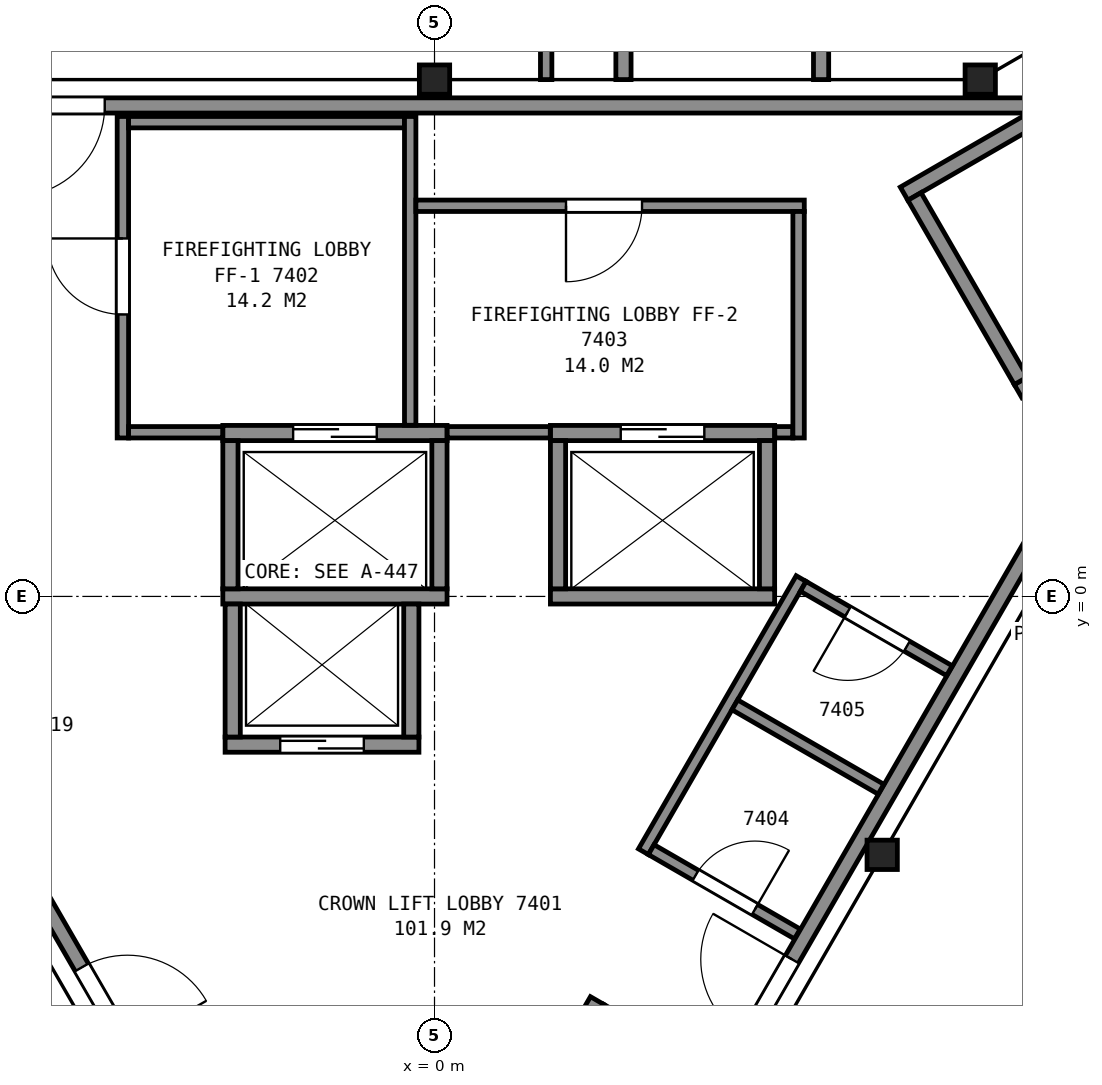
"""IFC4 building model, lengths in metres.
Left out: names, types, materials, properties, quantities, classifications, styles, units other than length and angle.
Written with IfcOpenShell. Run it as: python <this file> out.ifc"""

import sys

from ifc_helpers import new_model, si_unit, direction, frame, frame_2d, origin, origin_2d, place, context, subcontext, project, spatial, rectangle, i_section, extrude, element, fill, save


model = new_model("IFC4")
c1 = context("Model", 3, precision=1e-05, world=origin(), true_north=direction((0.0, 1.0)))
c2 = subcontext(c1, "Body", "Model", "MODEL_VIEW")
j1 = project(units=[si_unit("LENGTHUNIT", "METRE"), si_unit("PLANEANGLEUNIT", "RADIAN")], contexts=[c1])
p1 = place(None, origin())
s1 = spatial("IfcSite", under=j1, at=p1, CompositionType="ELEMENT")
p2 = place(p1, origin())
s2 = spatial("IfcBuilding", under=s1, at=p2, CompositionType="ELEMENT")
p3 = place(p2, frame((0.0, 0.0, 293.6)))
s3 = spatial("IfcBuildingStorey", under=s2, at=p3, CompositionType="ELEMENT", Elevation=293.6)
for number, where, z_axis, x_axis in (
    (1, (7.18, 6.8, 0.0), (0.0, 0.0, 1.0), (1.0, 0.0, 0.0)),
    (2, (0.0, 6.8, 0.0), (0.0, 0.0, 1.0), (1.0, 0.0, 0.0)),
    (3, (5.89, -3.4, 0.0), (0.0, 0.0, 1.0), (1.0, 0.0, 0.0)),
):
    element("IfcColumn", number, at=place(p3, frame(where, z_axis=z_axis, x_axis=x_axis)), inside=s3, PredefinedType="COLUMN", context=c2, shape_type="SweptSolid", body=[
        extrude(i_section(OverallWidth=0.399, OverallDepth=0.386, WebThickness=0.021, FlangeThickness=0.033, FilletRadius=0.015, at=origin_2d()), origin(), (0.0, 0.0, 1.0), 3.7),
    ])
for number, where, z_axis, x_axis in (
    (4, (6.178, 5.299, 0.0), (0.0, 0.0, 1.0), (0.866, 0.5, 0.0)),
    (5, (7.678, 2.701, 0.0), (0.0, 0.0, 1.0), (0.866, 0.5, 0.0)),
):
    element("IfcWall", number, at=place(p3, frame(where, z_axis=z_axis, x_axis=x_axis)), inside=s3, PredefinedType="PARTITIONING", context=c2, shape_type="SweptSolid", body=[
        extrude(rectangle(XDim=7.2, YDim=0.2, at=frame_2d((3.6, 0.0))), origin(), (0.0, 0.0, 1.0), 3.45),
    ])
p4 = place(p3, frame((7.715, 2.838, 0.0), z_axis=(0.0, 0.0, 1.0), x_axis=(-0.500049511043, 0.865996816683, 0.0)))
e6 = element("IfcWall", 6, at=p4, inside=s3, PredefinedType="PARTITIONING", context=c2, shape_type="SweptSolid", body=[
    extrude(rectangle(XDim=2.8, YDim=0.2, at=frame_2d((1.4, 0.0))), origin(), (0.0, 0.0, 1.0), 3.45),
])
p5 = place(p3, frame((-2.755, -1.95, 0.0), z_axis=(0.0, 0.0, 1.0), x_axis=(1.0, 0.0, 0.0)))
e7 = element("IfcWall", 7, at=p5, inside=s3, PredefinedType="PARTITIONING", context=c2, shape_type="SweptSolid", body=[
    extrude(rectangle(XDim=2.55, YDim=0.2, at=frame_2d((1.275, 0.0))), origin(), (0.0, 0.0, 1.0), 3.7),
])
p6 = place(p5, frame((0.725, 0.0, 0.0)))
e8 = element("IfcOpeningElement", 8, at=p6, cuts=e7, PredefinedType="OPENING", context=c2, shape_type="SweptSolid", body=[
    extrude(rectangle(XDim=1.1, YDim=2.1, at=frame_2d((0.55, 1.05))), frame((0.0, 0.11, 0.0), z_axis=(0.0, -1.0, 0.0), x_axis=(1.0, 0.0, 0.0)), (0.0, 0.0, 1.0), 0.22),
])
p7 = place(p3, frame((-2.785, 0.0, 0.0), z_axis=(0.0, 0.0, 1.0), x_axis=(1.0, 0.0, 0.0)))
e9 = element("IfcWall", 9, at=p7, inside=s3, PredefinedType="PARTITIONING", context=c2, shape_type="SweptSolid", body=[
    extrude(rectangle(XDim=2.95, YDim=0.2, at=frame_2d((1.475, 0.0))), origin(), (0.0, 0.0, 1.0), 3.7),
])
p8 = place(p3, frame((1.525, 0.0, 0.0), z_axis=(0.0, 0.0, 1.0), x_axis=(1.0, 0.0, 0.0)))
e10 = element("IfcWall", 10, at=p8, inside=s3, PredefinedType="PARTITIONING", context=c2, shape_type="SweptSolid", body=[
    extrude(rectangle(XDim=2.95, YDim=0.2, at=frame_2d((1.475, 0.0))), origin(), (0.0, 0.0, 1.0), 3.7),
])
p9 = place(p3, frame((-2.785, 2.15, 0.0), z_axis=(0.0, 0.0, 1.0), x_axis=(1.0, 0.0, 0.0)))
e11 = element("IfcWall", 11, at=p9, inside=s3, PredefinedType="PARTITIONING", context=c2, shape_type="SweptSolid", body=[
    extrude(rectangle(XDim=2.95, YDim=0.2, at=frame_2d((1.475, 0.0))), origin(), (0.0, 0.0, 1.0), 3.7),
])
p10 = place(p9, frame((0.925, 0.0, 0.0)))
e12 = element("IfcOpeningElement", 12, at=p10, cuts=e11, PredefinedType="OPENING", context=c2, shape_type="SweptSolid", body=[
    extrude(rectangle(XDim=1.1, YDim=2.1, at=frame_2d((0.55, 1.05))), frame((0.0, 0.11, 0.0), z_axis=(0.0, -1.0, 0.0), x_axis=(1.0, 0.0, 0.0)), (0.0, 0.0, 1.0), 0.22),
])
p11 = place(p3, frame((1.525, 2.15, 0.0), z_axis=(0.0, 0.0, 1.0), x_axis=(1.0, 0.0, 0.0)))
e13 = element("IfcWall", 13, at=p11, inside=s3, PredefinedType="PARTITIONING", context=c2, shape_type="SweptSolid", body=[
    extrude(rectangle(XDim=2.95, YDim=0.2, at=frame_2d((1.475, 0.0))), origin(), (0.0, 0.0, 1.0), 3.7),
])
p12 = place(p11, frame((0.925, 0.0, 0.0)))
e14 = element("IfcOpeningElement", 14, at=p12, cuts=e13, PredefinedType="OPENING", context=c2, shape_type="SweptSolid", body=[
    extrude(rectangle(XDim=1.1, YDim=2.1, at=frame_2d((0.55, 1.05))), frame((0.0, 0.11, 0.0), z_axis=(0.0, -1.0, 0.0), x_axis=(1.0, 0.0, 0.0)), (0.0, 0.0, 1.0), 0.22),
])
p13 = place(p3, frame((0.863, -7.525, 0.0), z_axis=(0.0, 0.0, 1.0), x_axis=(0.499990435942, 0.866030925526, 0.0)))
e15 = element("IfcWall", 15, at=p13, inside=s3, PredefinedType="PARTITIONING", context=c2, shape_type="SweptSolid", body=[
    extrude(rectangle(XDim=2.55, YDim=0.2, at=frame_2d((1.275, 0.0))), origin(), (0.0, 0.0, 1.0), 3.7),
])
p14 = place(p13, frame((0.725, 0.0, 0.0)))
e16 = element("IfcOpeningElement", 16, at=p14, cuts=e15, PredefinedType="OPENING", context=c2, shape_type="SweptSolid", body=[
    extrude(rectangle(XDim=1.1, YDim=2.1, at=frame_2d((0.55, 1.05))), frame((0.0, 0.11, 0.0), z_axis=(0.0, -1.0, 0.0), x_axis=(1.0, 0.0, 0.0)), (0.0, 0.0, 1.0), 0.22),
])
for number, where, z_axis, x_axis in (
    (17, (4.375, 0.1, 0.0), (0.0, 0.0, 1.0), (0.0, 1.0, 0.0)),
    (18, (1.625, 0.1, 0.0), (0.0, 0.0, 1.0), (0.0, 1.0, 0.0)),
    (19, (0.065, 0.1, 0.0), (0.0, 0.0, 1.0), (0.0, 1.0, 0.0)),
):
    element("IfcWall", number, at=place(p3, frame(where, z_axis=z_axis, x_axis=x_axis)), inside=s3, PredefinedType="PARTITIONING", context=c2, shape_type="SweptSolid", body=[
        extrude(rectangle(XDim=1.95, YDim=0.2, at=frame_2d((0.975, 0.0))), origin(), (0.0, 0.0, 1.0), 3.7),
    ])
for number, where, z_axis, x_axis in (
    (20, (-0.305, -1.85, 0.0), (0.0, 0.0, 1.0), (0.0, 1.0, 0.0)),
    (21, (-2.655, -1.85, 0.0), (0.0, 0.0, 1.0), (0.0, 1.0, 0.0)),
):
    element("IfcWall", number, at=place(p3, frame(where, z_axis=z_axis, x_axis=x_axis)), inside=s3, PredefinedType="PARTITIONING", context=c2, shape_type="SweptSolid", body=[
        extrude(rectangle(XDim=1.75, YDim=0.2, at=frame_2d((0.875, 0.0))), origin(), (0.0, 0.0, 1.0), 3.7),
    ])
p15 = place(p3, frame((-2.685, 0.1, 0.0), z_axis=(0.0, 0.0, 1.0), x_axis=(0.0, 1.0, 0.0)))
e22 = element("IfcWall", 22, at=p15, inside=s3, PredefinedType="PARTITIONING", context=c2, shape_type="SweptSolid", body=[
    extrude(rectangle(XDim=1.95, YDim=0.2, at=frame_2d((0.975, 0.0))), origin(), (0.0, 0.0, 1.0), 3.7),
])
p16 = place(p3, frame((3.69, -6.328, 0.0), z_axis=(0.0, 0.0, 1.0), x_axis=(-0.866036909293, 0.499980071345, 0.0)))
e23 = element("IfcWall", 23, at=p16, inside=s3, PredefinedType="PARTITIONING", context=c2, shape_type="SweptSolid", body=[
    extrude(rectangle(XDim=1.75, YDim=0.2, at=frame_2d((0.875, 0.0))), origin(), (0.0, 0.0, 1.0), 3.7),
])
p17 = place(p3, frame((7.829, 6.46, 0.0), z_axis=(0.0, 0.0, 1.0), x_axis=(-1.0, 0.0, 0.0)))
e24 = element("IfcWall", 24, at=p17, inside=s3, PredefinedType="PARTITIONING", context=c2, shape_type="SweptSolid", body=[
    extrude(rectangle(XDim=15.658, YDim=0.2, at=frame_2d((7.829, 0.0))), origin(), (0.0, 0.0, 1.0), 3.45),
])
p18 = place(p17, frame((12.168, 0.0, 0.0)))
e25 = element("IfcOpeningElement", 25, at=p18, cuts=e24, PredefinedType="OPENING", context=c2, shape_type="SweptSolid", body=[
    extrude(rectangle(XDim=1.2, YDim=2.1, at=frame_2d((0.6, 1.05))), frame((0.0, 0.11, 0.0), z_axis=(0.0, -1.0, 0.0), x_axis=(1.0, 0.0, 0.0)), (0.0, 0.0, 1.0), 0.22),
])
p19 = place(p3, frame((-7.141, -0.551, 0.0), z_axis=(0.0, 0.0, 1.0), x_axis=(0.500001302854, -0.86602465158, 0.0)))
e26 = element("IfcWall", 26, at=p19, inside=s3, PredefinedType="PARTITIONING", context=c2, shape_type="SweptSolid", body=[
    extrude(rectangle(XDim=6.846, YDim=0.2, at=frame_2d((3.423, 0.0))), origin(), (0.0, 0.0, 1.0), 3.45),
])
p20 = place(p19, frame((5.0, 0.0, 0.0)))
e27 = element("IfcOpeningElement", 27, at=p20, cuts=e26, PredefinedType="OPENING", context=c2, shape_type="SweptSolid", body=[
    extrude(rectangle(XDim=1.2, YDim=2.1, at=frame_2d((0.6, 1.05))), frame((0.0, 0.11, 0.0), z_axis=(0.0, -1.0, 0.0), x_axis=(1.0, 0.0, 0.0)), (0.0, 0.0, 1.0), 0.22),
])
p21 = place(p3, frame((-4.1, 2.085, 0.0), z_axis=(0.0, 0.0, 1.0), x_axis=(0.0, 1.0, 0.0)))
e28 = element("IfcWall", 28, at=p21, inside=s3, PredefinedType="PARTITIONING", context=c2, shape_type="SweptSolid", body=[
    extrude(rectangle(XDim=4.23, YDim=0.15, at=frame_2d((2.115, 0.0))), origin(), (0.0, 0.0, 1.0), 3.45),
])
p22 = place(p21, frame((1.625, 0.0, 0.0)))
e29 = element("IfcOpeningElement", 29, at=p22, cuts=e28, PredefinedType="OPENING", context=c2, shape_type="SweptSolid", body=[
    extrude(rectangle(XDim=1.0, YDim=2.1, at=frame_2d((0.5, 1.05))), frame((0.0, 0.085, 0.0), z_axis=(0.0, -1.0, 0.0), x_axis=(1.0, 0.0, 0.0)), (0.0, 0.0, 1.0), 0.17),
])
p23 = place(p3, frame((-4.025, 2.16, 0.0), z_axis=(0.0, 0.0, 1.0), x_axis=(1.0, 0.0, 0.0)))
e30 = element("IfcWall", 30, at=p23, inside=s3, PredefinedType="PARTITIONING", context=c2, shape_type="SweptSolid", body=[
    extrude(rectangle(XDim=1.238, YDim=0.15, at=frame_2d((0.619, 0.0))), origin(), (0.0, 0.0, 1.0), 3.45),
])
p24 = place(p3, frame((-4.025, 6.24, 0.0), z_axis=(0.0, 0.0, 1.0), x_axis=(1.0, 0.0, 0.0)))
e31 = element("IfcWall", 31, at=p24, inside=s3, PredefinedType="PARTITIONING", context=c2, shape_type="SweptSolid", body=[
    extrude(rectangle(XDim=3.63, YDim=0.15, at=frame_2d((1.815, 0.0))), origin(), (0.0, 0.0, 1.0), 3.45),
])
p25 = place(p3, frame((-0.32, 2.252, 0.0), z_axis=(0.0, 0.0, 1.0), x_axis=(0.0, 1.0, 0.0)))
e32 = element("IfcWall", 32, at=p25, inside=s3, PredefinedType="PARTITIONING", context=c2, shape_type="SweptSolid", body=[
    extrude(rectangle(XDim=4.063, YDim=0.15, at=frame_2d((2.031, 0.0))), origin(), (0.0, 0.0, 1.0), 3.45),
])
p26 = place(p3, frame((-0.245, 5.14, 0.0), z_axis=(0.0, 0.0, 1.0), x_axis=(1.0, 0.0, 0.0)))
e33 = element("IfcWall", 33, at=p26, inside=s3, PredefinedType="PARTITIONING", context=c2, shape_type="SweptSolid", body=[
    extrude(rectangle(XDim=5.11, YDim=0.15, at=frame_2d((2.555, 0.0))), origin(), (0.0, 0.0, 1.0), 3.45),
])
p27 = place(p26, frame((1.975, 0.0, 0.0)))
e34 = element("IfcOpeningElement", 34, at=p27, cuts=e33, PredefinedType="OPENING", context=c2, shape_type="SweptSolid", body=[
    extrude(rectangle(XDim=1.0, YDim=2.1, at=frame_2d((0.5, 1.05))), frame((0.0, 0.085, 0.0), z_axis=(0.0, -1.0, 0.0), x_axis=(1.0, 0.0, 0.0)), (0.0, 0.0, 1.0), 0.17),
])
p28 = place(p3, frame((0.167, 2.16, 0.0), z_axis=(0.0, 0.0, 1.0), x_axis=(1.0, 0.0, 0.0)))
e35 = element("IfcWall", 35, at=p28, inside=s3, PredefinedType="PARTITIONING", context=c2, shape_type="SweptSolid", body=[
    extrude(rectangle(XDim=1.356, YDim=0.15, at=frame_2d((0.678, 0.0))), origin(), (0.0, 0.0, 1.0), 3.45),
])
p29 = place(p3, frame((2.749, -3.359, 0.0), z_axis=(0.0, 0.0, 1.0), x_axis=(0.500017827812, 0.866015110648, 0.0)))
e36 = element("IfcWall", 36, at=p29, inside=s3, PredefinedType="PARTITIONING", context=c2, shape_type="SweptSolid", body=[
    extrude(rectangle(XDim=4.15, YDim=0.15, at=frame_2d((2.075, 0.0))), origin(), (0.0, 0.0, 1.0), 3.45),
])
p30 = place(p3, frame((2.851, -3.332, 0.0), z_axis=(0.0, 0.0, 1.0), x_axis=(0.866110524189, -0.499852538144, 0.0)))
e37 = element("IfcWall", 37, at=p30, inside=s3, PredefinedType="PARTITIONING", context=c2, shape_type="SweptSolid", body=[
    extrude(rectangle(XDim=2.22, YDim=0.15, at=frame_2d((1.11, 0.0))), origin(), (0.0, 0.0, 1.0), 3.45),
])
p31 = place(p30, frame((0.675, 0.0, 0.0)))
e38 = element("IfcOpeningElement", 38, at=p31, cuts=e37, PredefinedType="OPENING", context=c2, shape_type="SweptSolid", body=[
    extrude(rectangle(XDim=0.9, YDim=2.1, at=frame_2d((0.45, 1.05))), frame((0.0, 0.085, 0.0), z_axis=(0.0, -1.0, 0.0), x_axis=(1.0, 0.0, 0.0)), (0.0, 0.0, 1.0), 0.17),
])
p32 = place(p3, frame((3.828, -6.29, 0.0), z_axis=(0.0, 0.0, 1.0), x_axis=(0.499979739078, 0.866037101117, 0.0)))
e39 = element("IfcWall", 39, at=p32, inside=s3, PredefinedType="PARTITIONING", context=c2, shape_type="SweptSolid", body=[
    extrude(rectangle(XDim=11.363, YDim=0.2, at=frame_2d((5.681, 0.0))), origin(), (0.0, 0.0, 1.0), 3.45),
])
p33 = place(p32, frame((0.55, 0.0, 0.0)))
e40 = element("IfcOpeningElement", 40, at=p33, cuts=e39, PredefinedType="OPENING", context=c2, shape_type="SweptSolid", body=[
    extrude(rectangle(XDim=1.2, YDim=2.1, at=frame_2d((0.6, 1.05))), frame((0.0, 0.11, 0.0), z_axis=(0.0, -1.0, 0.0), x_axis=(1.0, 0.0, 0.0)), (0.0, 0.0, 1.0), 0.22),
])
p34 = place(p3, frame((3.951, -1.427, 0.0), z_axis=(0.0, 0.0, 1.0), x_axis=(0.866062920605, -0.499935013329, 0.0)))
e41 = element("IfcWall", 41, at=p34, inside=s3, PredefinedType="PARTITIONING", context=c2, shape_type="SweptSolid", body=[
    extrude(rectangle(XDim=2.22, YDim=0.15, at=frame_2d((1.11, 0.0))), origin(), (0.0, 0.0, 1.0), 3.45),
])
p35 = place(p3, frame((4.477, 2.16, 0.0), z_axis=(0.0, 0.0, 1.0), x_axis=(1.0, 0.0, 0.0)))
e42 = element("IfcWall", 42, at=p35, inside=s3, PredefinedType="PARTITIONING", context=c2, shape_type="SweptSolid", body=[
    extrude(rectangle(XDim=0.238, YDim=0.15, at=frame_2d((0.119, 0.0))), origin(), (0.0, 0.0, 1.0), 3.45),
])
p36 = place(p3, frame((6.774, -0.978, 0.0), z_axis=(0.0, 0.0, 1.0), x_axis=(-0.866062920605, 0.499935013329, 0.0)))
e43 = element("IfcWall", 43, at=p36, inside=s3, PredefinedType="PARTITIONING", context=c2, shape_type="SweptSolid", body=[
    extrude(rectangle(XDim=2.22, YDim=0.15, at=frame_2d((1.11, 0.0))), origin(), (0.0, 0.0, 1.0), 3.45),
])
p37 = place(p36, frame((0.646, 0.0, 0.0)))
e44 = element("IfcOpeningElement", 44, at=p37, cuts=e43, PredefinedType="OPENING", context=c2, shape_type="SweptSolid", body=[
    extrude(rectangle(XDim=0.9, YDim=2.1, at=frame_2d((0.45, 1.05))), frame((0.0, 0.085, 0.0), z_axis=(0.0, -1.0, 0.0), x_axis=(1.0, 0.0, 0.0)), (0.0, 0.0, 1.0), 0.17),
])
p38 = place(p3, frame((4.79, 2.085, 0.0), z_axis=(0.0, 0.0, 1.0), x_axis=(0.0, 1.0, 0.0)))
e45 = element("IfcWall", 45, at=p38, inside=s3, PredefinedType="PARTITIONING", context=c2, shape_type="SweptSolid", body=[
    extrude(rectangle(XDim=2.98, YDim=0.15, at=frame_2d((1.49, 0.0))), origin(), (0.0, 0.0, 1.0), 3.45),
])
p39 = place(p3, frame((1.469, 6.8, 0.0), z_axis=(0.0, 0.0, 1.0), x_axis=(0.0, 1.0, 0.0)))
e46 = element("IfcWall", 46, at=p39, inside=s3, PredefinedType="PARTITIONING", context=c2, shape_type="SweptSolid", body=[
    extrude(rectangle(XDim=1.469, YDim=0.15, at=frame_2d((0.734, 0.0))), origin(), (0.0, 0.0, 1.0), 2.723),
])
p40 = place(p3, frame((2.486, 6.8, 0.0), z_axis=(0.0, 0.0, 1.0), x_axis=(0.0, 1.0, 0.0)))
e47 = element("IfcWall", 47, at=p40, inside=s3, PredefinedType="PARTITIONING", context=c2, shape_type="SweptSolid", body=[
    extrude(rectangle(XDim=3.453, YDim=0.2, at=frame_2d((1.727, 0.0))), origin(), (0.0, 0.0, 1.0), 2.723),
])
p41 = place(p3, frame((5.086, 6.8, 0.0), z_axis=(0.0, 0.0, 1.0), x_axis=(0.0, 1.0, 0.0)))
e48 = element("IfcWall", 48, at=p41, inside=s3, PredefinedType="PARTITIONING", context=c2, shape_type="SweptSolid", body=[
    extrude(rectangle(XDim=3.845, YDim=0.2, at=frame_2d((1.922, 0.0))), origin(), (0.0, 0.0, 1.0), 2.723),
])
p42 = place(p3, frame((7.772, -5.706, 0.0), z_axis=(0.0, 0.0, 1.0), x_axis=(0.707106781187, 0.707106781187, 0.0)))
e49 = element("IfcWall", 49, at=p42, inside=s3, PredefinedType="PARTITIONING", context=c2, shape_type="SweptSolid", body=[
    extrude(rectangle(XDim=1.044, YDim=0.2, at=frame_2d((0.522, 0.0))), origin(), (0.0, 0.0, 1.0), 2.723),
])
p43 = place(p6, origin())
e50 = element("IfcDoor", 50, at=p43, inside=s3, OperationType="SLIDING_TO_RIGHT", PredefinedType="DOOR", context=c2, shape_type="SweptSolid", body=[
    extrude(rectangle(XDim=1.1, YDim=2.1, at=frame_2d((0.55, 1.05))), frame((0.0, 0.025, 0.0), z_axis=(0.0, -1.0, 0.0), x_axis=(1.0, 0.0, 0.0)), (0.0, 0.0, 1.0), 0.05),
])
fill(e8, e50)
p44 = place(p10, origin())
e51 = element("IfcDoor", 51, at=p44, inside=s3, OperationType="SLIDING_TO_LEFT", PredefinedType="DOOR", context=c2, shape_type="SweptSolid", body=[
    extrude(rectangle(XDim=1.1, YDim=2.1, at=frame_2d((0.55, 1.05))), frame((0.0, 0.025, 0.0), z_axis=(0.0, -1.0, 0.0), x_axis=(1.0, 0.0, 0.0)), (0.0, 0.0, 1.0), 0.05),
])
fill(e12, e51)
p45 = place(p12, origin())
e52 = element("IfcDoor", 52, at=p45, inside=s3, OperationType="SLIDING_TO_RIGHT", PredefinedType="DOOR", context=c2, shape_type="SweptSolid", body=[
    extrude(rectangle(XDim=1.1, YDim=2.1, at=frame_2d((0.55, 1.05))), frame((0.0, 0.025, 0.0), z_axis=(0.0, -1.0, 0.0), x_axis=(1.0, 0.0, 0.0)), (0.0, 0.0, 1.0), 0.05),
])
fill(e14, e52)
p46 = place(p18, origin())
e53 = element("IfcDoor", 53, at=p46, inside=s3, OperationType="SINGLE_SWING_RIGHT", PredefinedType="DOOR", context=c2, shape_type="SweptSolid", body=[
    extrude(rectangle(XDim=1.2, YDim=2.1, at=frame_2d((0.6, 1.05))), frame((0.0, 0.025, 0.0), z_axis=(0.0, -1.0, 0.0), x_axis=(1.0, 0.0, 0.0)), (0.0, 0.0, 1.0), 0.05),
])
fill(e25, e53)
p47 = place(p20, origin())
e54 = element("IfcDoor", 54, at=p47, inside=s3, OperationType="SINGLE_SWING_RIGHT", PredefinedType="DOOR", context=c2, shape_type="SweptSolid", body=[
    extrude(rectangle(XDim=1.2, YDim=2.1, at=frame_2d((0.6, 1.05))), frame((0.0, 0.025, 0.0), z_axis=(0.0, -1.0, 0.0), x_axis=(1.0, 0.0, 0.0)), (0.0, 0.0, 1.0), 0.05),
])
fill(e27, e54)
p48 = place(p22, origin())
e55 = element("IfcDoor", 55, at=p48, inside=s3, OperationType="SINGLE_SWING_RIGHT", PredefinedType="DOOR", context=c2, shape_type="SweptSolid", body=[
    extrude(rectangle(XDim=1.0, YDim=2.1, at=frame_2d((0.5, 1.05))), frame((0.0, 0.025, 0.0), z_axis=(0.0, -1.0, 0.0), x_axis=(1.0, 0.0, 0.0)), (0.0, 0.0, 1.0), 0.05),
])
fill(e29, e55)
p49 = place(p27, origin())
e56 = element("IfcDoor", 56, at=p49, inside=s3, OperationType="SINGLE_SWING_LEFT", PredefinedType="DOOR", context=c2, shape_type="SweptSolid", body=[
    extrude(rectangle(XDim=1.0, YDim=2.1, at=frame_2d((0.5, 1.05))), frame((0.0, 0.025, 0.0), z_axis=(0.0, -1.0, 0.0), x_axis=(1.0, 0.0, 0.0)), (0.0, 0.0, 1.0), 0.05),
])
fill(e34, e56)
p50 = place(p31, origin())
e57 = element("IfcDoor", 57, at=p50, inside=s3, OperationType="SINGLE_SWING_RIGHT", PredefinedType="DOOR", context=c2, shape_type="SweptSolid", body=[
    extrude(rectangle(XDim=0.9, YDim=2.1, at=frame_2d((0.45, 1.05))), frame((0.0, 0.025, 0.0), z_axis=(0.0, -1.0, 0.0), x_axis=(1.0, 0.0, 0.0)), (0.0, 0.0, 1.0), 0.05),
])
fill(e38, e57)
p51 = place(p33, origin())
e58 = element("IfcDoor", 58, at=p51, inside=s3, OperationType="SINGLE_SWING_RIGHT", PredefinedType="DOOR", context=c2, shape_type="SweptSolid", body=[
    extrude(rectangle(XDim=1.2, YDim=2.1, at=frame_2d((0.6, 1.05))), frame((0.0, 0.025, 0.0), z_axis=(0.0, -1.0, 0.0), x_axis=(1.0, 0.0, 0.0)), (0.0, 0.0, 1.0), 0.05),
])
fill(e40, e58)
p52 = place(p37, origin())
e59 = element("IfcDoor", 59, at=p52, inside=s3, OperationType="SINGLE_SWING_RIGHT", PredefinedType="DOOR", context=c2, shape_type="SweptSolid", body=[
    extrude(rectangle(XDim=0.9, YDim=2.1, at=frame_2d((0.45, 1.05))), frame((0.0, 0.025, 0.0), z_axis=(0.0, -1.0, 0.0), x_axis=(1.0, 0.0, 0.0)), (0.0, 0.0, 1.0), 0.05),
])
fill(e44, e59)
save(model, sys.argv[1])
